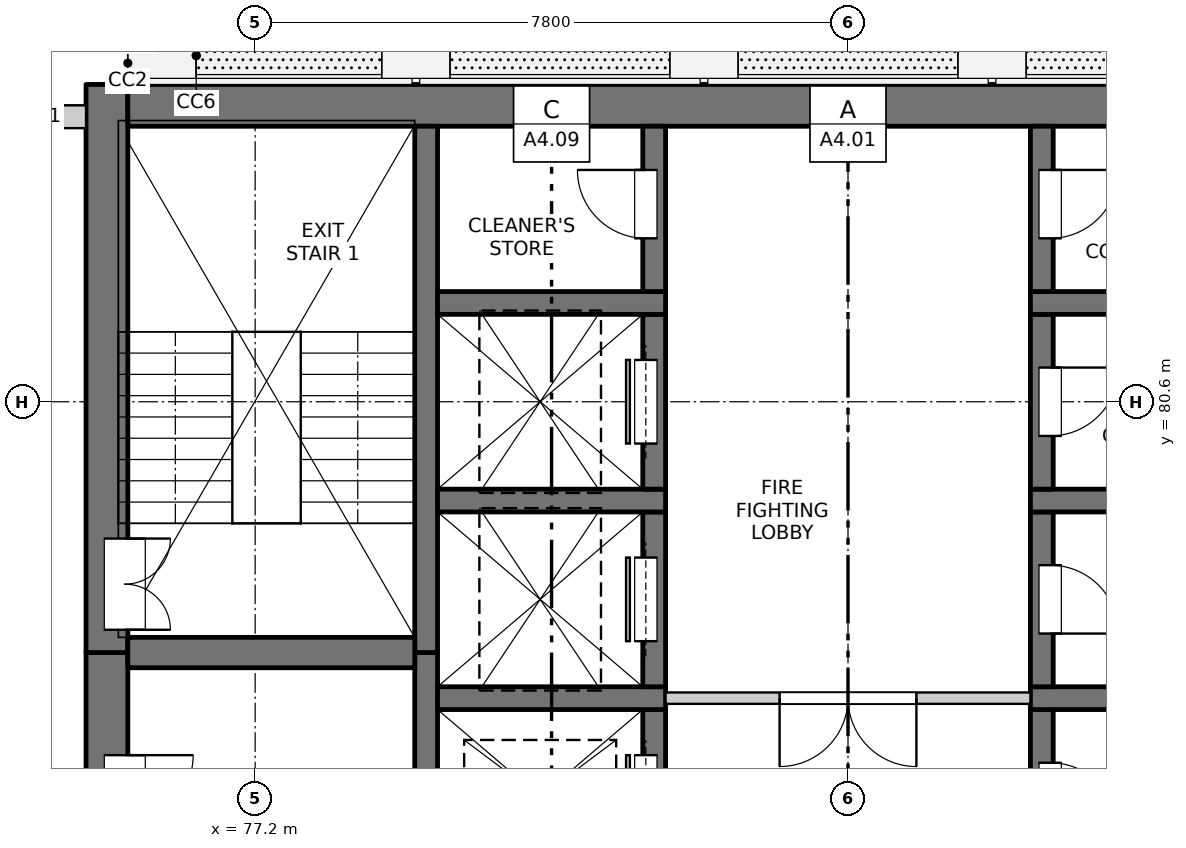
"""IFC4 building model, lengths in metres.
Left out: names, types, materials, properties, quantities, classifications, styles, units other than length and angle.
Written with IfcOpenShell. Run it as: python <this file> out.ifc"""

import sys

from ifc_helpers import new_model, si_unit, direction, frame, frame_2d, origin, place, context, subcontext, project, spatial, rectangle, extrude, element, fill, save


model = new_model("IFC4")
c1 = context("Model", 3, precision=1e-05, world=origin(), true_north=direction((0.0, 1.0)))
c2 = subcontext(c1, "Body", "Model", "MODEL_VIEW")
j1 = project(units=[si_unit("LENGTHUNIT", "METRE"), si_unit("PLANEANGLEUNIT", "RADIAN")], contexts=[c1])
p1 = place(None, origin())
s1 = spatial("IfcSite", under=j1, at=p1, CompositionType="ELEMENT")
p2 = place(p1, origin())
s2 = spatial("IfcBuilding", under=s1, at=p2, CompositionType="ELEMENT")
p3 = place(p2, frame((0.0, 0.0, 123.7)))
s3 = spatial("IfcBuildingStorey", under=s2, at=p3, CompositionType="ELEMENT", Elevation=123.7)
p4 = place(p3, frame((75.25, 54.975, -0.3), z_axis=(0.0, 0.0, 1.0), x_axis=(0.0, 1.0, 0.0)))
e1 = element("IfcWall", 1, at=p4, inside=s3, PredefinedType="SOLIDWALL", context=c2, shape_type="SweptSolid", body=[
    extrude(rectangle(XDim=22.325, YDim=0.55, at=frame_2d((11.163, 0.0))), origin(), (0.0, 0.0, 1.0), 3.45),
])
p5 = place(p4, frame((7.475, 0.0, 0.3)))
e2 = element("IfcOpeningElement", 2, at=p5, cuts=e1, PredefinedType="OPENING", context=c2, shape_type="SweptSolid", body=[
    extrude(rectangle(XDim=0.9, YDim=2.1, at=frame_2d((0.45, 1.05))), frame((0.0, 0.285, 0.0), z_axis=(0.0, -1.0, 0.0), x_axis=(1.0, 0.0, 0.0)), (0.0, 0.0, 1.0), 0.57),
])
p6 = place(p4, frame((10.775, 0.0, 0.3)))
e3 = element("IfcOpeningElement", 3, at=p6, cuts=e1, PredefinedType="OPENING", context=c2, shape_type="SweptSolid", body=[
    extrude(rectangle(XDim=0.9, YDim=2.1, at=frame_2d((0.45, 1.05))), frame((0.0, 0.285, 0.0), z_axis=(0.0, -1.0, 0.0), x_axis=(1.0, 0.0, 0.0)), (0.0, 0.0, 1.0), 0.57),
])
p7 = place(p4, frame((13.775, 0.0, 0.3)))
e4 = element("IfcOpeningElement", 4, at=p7, cuts=e1, PredefinedType="OPENING", context=c2, shape_type="SweptSolid", body=[
    extrude(rectangle(XDim=0.9, YDim=2.1, at=frame_2d((0.45, 1.05))), frame((0.0, 0.285, 0.0), z_axis=(0.0, -1.0, 0.0), x_axis=(1.0, 0.0, 0.0)), (0.0, 0.0, 1.0), 0.57),
])
p8 = place(p4, frame((16.775, 0.0, 0.3)))
e5 = element("IfcOpeningElement", 5, at=p8, cuts=e1, PredefinedType="OPENING", context=c2, shape_type="SweptSolid", body=[
    extrude(rectangle(XDim=0.9, YDim=2.1, at=frame_2d((0.45, 1.05))), frame((0.0, 0.285, 0.0), z_axis=(0.0, -1.0, 0.0), x_axis=(1.0, 0.0, 0.0)), (0.0, 0.0, 1.0), 0.57),
])
p9 = place(p4, frame((20.075, 0.0, 0.3)))
e6 = element("IfcOpeningElement", 6, at=p9, cuts=e1, PredefinedType="OPENING", context=c2, shape_type="SweptSolid", body=[
    extrude(rectangle(XDim=0.9, YDim=2.1, at=frame_2d((0.45, 1.05))), frame((0.0, 0.285, 0.0), z_axis=(0.0, -1.0, 0.0), x_axis=(1.0, 0.0, 0.0)), (0.0, 0.0, 1.0), 0.57),
])
p10 = place(p3, frame((75.25, 77.3, -0.3), z_axis=(0.0, 0.0, 1.0), x_axis=(0.0, 1.0, 0.0)))
e7 = element("IfcWall", 7, at=p10, inside=s3, PredefinedType="SOLIDWALL", context=c2, shape_type="SweptSolid", body=[
    extrude(rectangle(XDim=7.475, YDim=0.55, at=frame_2d((3.737, 0.0))), origin(), (0.0, 0.0, 1.0), 3.45),
])
p11 = place(p10, frame((0.3, 0.0, 0.3)))
e8 = element("IfcOpeningElement", 8, at=p11, cuts=e7, PredefinedType="OPENING", context=c2, shape_type="SweptSolid", body=[
    extrude(rectangle(XDim=1.2, YDim=2.1, at=frame_2d((0.6, 1.05))), frame((0.0, 0.285, 0.0), z_axis=(0.0, -1.0, 0.0), x_axis=(1.0, 0.0, 0.0)), (0.0, 0.0, 1.0), 0.57),
])
p12 = place(p3, frame((75.525, 84.5, -0.3), z_axis=(0.0, 0.0, 1.0), x_axis=(1.0, 0.0, 0.0)))
e9 = element("IfcWall", 9, at=p12, inside=s3, PredefinedType="SOLIDWALL", context=c2, shape_type="SweptSolid", body=[
    extrude(rectangle(XDim=18.95, YDim=0.55, at=frame_2d((9.475, 0.0))), origin(), (0.0, 0.0, 1.0), 3.45),
])
p13 = place(p3, frame((79.45, 60.95, -0.3), z_axis=(0.0, 0.0, 1.0), x_axis=(0.0, 1.0, 0.0)))
e10 = element("IfcWall", 10, at=p13, inside=s3, PredefinedType="SOLIDWALL", context=c2, shape_type="SweptSolid", body=[
    extrude(rectangle(XDim=16.35, YDim=0.3, at=frame_2d((8.175, 0.0))), origin(), (0.0, 0.0, 1.0), 3.45),
])
p14 = place(p3, frame((79.45, 77.3, -0.3), z_axis=(0.0, 0.0, 1.0), x_axis=(0.0, 1.0, 0.0)))
e11 = element("IfcWall", 11, at=p14, inside=s3, PredefinedType="SOLIDWALL", context=c2, shape_type="SweptSolid", body=[
    extrude(rectangle(XDim=6.925, YDim=0.3, at=frame_2d((3.462, 0.0))), origin(), (0.0, 0.0, 1.0), 3.45),
])
p15 = place(p3, frame((82.45, 74.25, -0.3), z_axis=(0.0, 0.0, 1.0), x_axis=(0.0, 1.0, 0.0)))
e12 = element("IfcWall", 12, at=p15, inside=s3, PredefinedType="SOLIDWALL", context=c2, shape_type="SweptSolid", body=[
    extrude(rectangle(XDim=2.3, YDim=0.3, at=frame_2d((1.15, 0.0))), origin(), (0.0, 0.0, 1.0), 3.45),
])
p16 = place(p15, frame((0.6, 0.0, 0.3)))
e13 = element("IfcOpeningElement", 13, at=p16, cuts=e12, PredefinedType="OPENING", context=c2, shape_type="SweptSolid", body=[
    extrude(rectangle(XDim=1.1, YDim=2.1, at=frame_2d((0.55, 1.05))), frame((0.0, 0.16, 0.0), z_axis=(0.0, -1.0, 0.0), x_axis=(1.0, 0.0, 0.0)), (0.0, 0.0, 1.0), 0.32),
])
p17 = place(p3, frame((79.6, 76.7, -0.3), z_axis=(0.0, 0.0, 1.0), x_axis=(1.0, 0.0, 0.0)))
e14 = element("IfcWall", 14, at=p17, inside=s3, PredefinedType="SOLIDWALL", context=c2, shape_type="SweptSolid", body=[
    extrude(rectangle(XDim=3.0, YDim=0.3, at=frame_2d((1.5, 0.0))), origin(), (0.0, 0.0, 1.0), 3.45),
])
p18 = place(p3, frame((82.45, 76.85, -0.3), z_axis=(0.0, 0.0, 1.0), x_axis=(0.0, 1.0, 0.0)))
e15 = element("IfcWall", 15, at=p18, inside=s3, PredefinedType="SOLIDWALL", context=c2, shape_type="SweptSolid", body=[
    extrude(rectangle(XDim=2.3, YDim=0.3, at=frame_2d((1.15, 0.0))), origin(), (0.0, 0.0, 1.0), 3.45),
])
p19 = place(p18, frame((0.6, 0.0, 0.3)))
e16 = element("IfcOpeningElement", 16, at=p19, cuts=e15, PredefinedType="OPENING", context=c2, shape_type="SweptSolid", body=[
    extrude(rectangle(XDim=1.1, YDim=2.1, at=frame_2d((0.55, 1.05))), frame((0.0, 0.16, 0.0), z_axis=(0.0, -1.0, 0.0), x_axis=(1.0, 0.0, 0.0)), (0.0, 0.0, 1.0), 0.32),
])
p20 = place(p3, frame((79.6, 79.3, -0.3), z_axis=(0.0, 0.0, 1.0), x_axis=(1.0, 0.0, 0.0)))
e17 = element("IfcWall", 17, at=p20, inside=s3, PredefinedType="SOLIDWALL", context=c2, shape_type="SweptSolid", body=[
    extrude(rectangle(XDim=3.0, YDim=0.3, at=frame_2d((1.5, 0.0))), origin(), (0.0, 0.0, 1.0), 3.45),
])
p21 = place(p3, frame((82.45, 79.45, -0.3), z_axis=(0.0, 0.0, 1.0), x_axis=(0.0, 1.0, 0.0)))
e18 = element("IfcWall", 18, at=p21, inside=s3, PredefinedType="SOLIDWALL", context=c2, shape_type="SweptSolid", body=[
    extrude(rectangle(XDim=2.3, YDim=0.3, at=frame_2d((1.15, 0.0))), origin(), (0.0, 0.0, 1.0), 3.45),
])
p22 = place(p21, frame((0.6, 0.0, 0.3)))
e19 = element("IfcOpeningElement", 19, at=p22, cuts=e18, PredefinedType="OPENING", context=c2, shape_type="SweptSolid", body=[
    extrude(rectangle(XDim=1.1, YDim=2.1, at=frame_2d((0.55, 1.05))), frame((0.0, 0.16, 0.0), z_axis=(0.0, -1.0, 0.0), x_axis=(1.0, 0.0, 0.0)), (0.0, 0.0, 1.0), 0.32),
])
p23 = place(p3, frame((79.6, 81.9, -0.3), z_axis=(0.0, 0.0, 1.0), x_axis=(1.0, 0.0, 0.0)))
e20 = element("IfcWall", 20, at=p23, inside=s3, PredefinedType="SOLIDWALL", context=c2, shape_type="SweptSolid", body=[
    extrude(rectangle(XDim=3.0, YDim=0.3, at=frame_2d((1.5, 0.0))), origin(), (0.0, 0.0, 1.0), 3.45),
])
p24 = place(p3, frame((82.45, 82.05, -0.3), z_axis=(0.0, 0.0, 1.0), x_axis=(0.0, 1.0, 0.0)))
e21 = element("IfcWall", 21, at=p24, inside=s3, PredefinedType="SOLIDWALL", context=c2, shape_type="SweptSolid", body=[
    extrude(rectangle(XDim=2.175, YDim=0.3, at=frame_2d((1.087, 0.0))), origin(), (0.0, 0.0, 1.0), 3.45),
])
p25 = place(p24, frame((0.7, 0.0, 0.3)))
e22 = element("IfcOpeningElement", 22, at=p25, cuts=e21, PredefinedType="OPENING", context=c2, shape_type="SweptSolid", body=[
    extrude(rectangle(XDim=0.9, YDim=2.1, at=frame_2d((0.45, 1.05))), frame((0.0, 0.16, 0.0), z_axis=(0.0, -1.0, 0.0), x_axis=(1.0, 0.0, 0.0)), (0.0, 0.0, 1.0), 0.32),
])
p26 = place(p3, frame((87.55, 74.25, -0.3), z_axis=(0.0, 0.0, 1.0), x_axis=(0.0, 1.0, 0.0)))
e23 = element("IfcWall", 23, at=p26, inside=s3, PredefinedType="SOLIDWALL", context=c2, shape_type="SweptSolid", body=[
    extrude(rectangle(XDim=2.3, YDim=0.3, at=frame_2d((1.15, 0.0))), origin(), (0.0, 0.0, 1.0), 3.45),
])
p27 = place(p26, frame((0.7, 0.0, 0.3)))
e24 = element("IfcOpeningElement", 24, at=p27, cuts=e23, PredefinedType="OPENING", context=c2, shape_type="SweptSolid", body=[
    extrude(rectangle(XDim=0.9, YDim=2.1, at=frame_2d((0.45, 1.05))), frame((0.0, 0.16, 0.0), z_axis=(0.0, -1.0, 0.0), x_axis=(1.0, 0.0, 0.0)), (0.0, 0.0, 1.0), 0.32),
])
p28 = place(p3, frame((87.4, 76.7, -0.3), z_axis=(0.0, 0.0, 1.0), x_axis=(1.0, 0.0, 0.0)))
e25 = element("IfcWall", 25, at=p28, inside=s3, PredefinedType="SOLIDWALL", context=c2, shape_type="SweptSolid", body=[
    extrude(rectangle(XDim=3.0, YDim=0.3, at=frame_2d((1.5, 0.0))), origin(), (0.0, 0.0, 1.0), 3.45),
])
p29 = place(p3, frame((87.55, 76.85, -0.3), z_axis=(0.0, 0.0, 1.0), x_axis=(0.0, 1.0, 0.0)))
e26 = element("IfcWall", 26, at=p29, inside=s3, PredefinedType="SOLIDWALL", context=c2, shape_type="SweptSolid", body=[
    extrude(rectangle(XDim=2.3, YDim=0.3, at=frame_2d((1.15, 0.0))), origin(), (0.0, 0.0, 1.0), 3.45),
])
p30 = place(p29, frame((0.7, 0.0, 0.3)))
e27 = element("IfcOpeningElement", 27, at=p30, cuts=e26, PredefinedType="OPENING", context=c2, shape_type="SweptSolid", body=[
    extrude(rectangle(XDim=0.9, YDim=2.1, at=frame_2d((0.45, 1.05))), frame((0.0, 0.16, 0.0), z_axis=(0.0, -1.0, 0.0), x_axis=(1.0, 0.0, 0.0)), (0.0, 0.0, 1.0), 0.32),
])
p31 = place(p3, frame((87.4, 79.3, -0.3), z_axis=(0.0, 0.0, 1.0), x_axis=(1.0, 0.0, 0.0)))
e28 = element("IfcWall", 28, at=p31, inside=s3, PredefinedType="SOLIDWALL", context=c2, shape_type="SweptSolid", body=[
    extrude(rectangle(XDim=3.0, YDim=0.3, at=frame_2d((1.5, 0.0))), origin(), (0.0, 0.0, 1.0), 3.45),
])
p32 = place(p3, frame((87.55, 79.45, -0.3), z_axis=(0.0, 0.0, 1.0), x_axis=(0.0, 1.0, 0.0)))
e29 = element("IfcWall", 29, at=p32, inside=s3, PredefinedType="SOLIDWALL", context=c2, shape_type="SweptSolid", body=[
    extrude(rectangle(XDim=2.3, YDim=0.3, at=frame_2d((1.15, 0.0))), origin(), (0.0, 0.0, 1.0), 3.45),
])
p33 = place(p32, frame((0.7, 0.0, 0.3)))
e30 = element("IfcOpeningElement", 30, at=p33, cuts=e29, PredefinedType="OPENING", context=c2, shape_type="SweptSolid", body=[
    extrude(rectangle(XDim=0.9, YDim=2.1, at=frame_2d((0.45, 1.05))), frame((0.0, 0.16, 0.0), z_axis=(0.0, -1.0, 0.0), x_axis=(1.0, 0.0, 0.0)), (0.0, 0.0, 1.0), 0.32),
])
p34 = place(p3, frame((87.4, 81.9, -0.3), z_axis=(0.0, 0.0, 1.0), x_axis=(1.0, 0.0, 0.0)))
e31 = element("IfcWall", 31, at=p34, inside=s3, PredefinedType="SOLIDWALL", context=c2, shape_type="SweptSolid", body=[
    extrude(rectangle(XDim=3.0, YDim=0.3, at=frame_2d((1.5, 0.0))), origin(), (0.0, 0.0, 1.0), 3.45),
])
p35 = place(p3, frame((87.55, 82.05, -0.3), z_axis=(0.0, 0.0, 1.0), x_axis=(0.0, 1.0, 0.0)))
e32 = element("IfcWall", 32, at=p35, inside=s3, PredefinedType="SOLIDWALL", context=c2, shape_type="SweptSolid", body=[
    extrude(rectangle(XDim=2.175, YDim=0.3, at=frame_2d((1.087, 0.0))), origin(), (0.0, 0.0, 1.0), 3.45),
])
p36 = place(p35, frame((0.7, 0.0, 0.3)))
e33 = element("IfcOpeningElement", 33, at=p36, cuts=e32, PredefinedType="OPENING", context=c2, shape_type="SweptSolid", body=[
    extrude(rectangle(XDim=0.9, YDim=2.1, at=frame_2d((0.45, 1.05))), frame((0.0, 0.16, 0.0), z_axis=(0.0, -1.0, 0.0), x_axis=(1.0, 0.0, 0.0)), (0.0, 0.0, 1.0), 0.32),
])
p37 = place(p3, frame((75.525, 77.3, -0.3), z_axis=(0.0, 0.0, 1.0), x_axis=(1.0, 0.0, 0.0)))
e34 = element("IfcWall", 34, at=p37, inside=s3, PredefinedType="SOLIDWALL", context=c2, shape_type="SweptSolid", body=[
    extrude(rectangle(XDim=3.775, YDim=0.4, at=frame_2d((1.888, 0.0))), origin(), (0.0, 0.0, 1.0), 3.45),
])
p38 = place(p3, frame((73.725, 84.35, 0.0), z_axis=(0.0, 0.0, 1.0), x_axis=(1.0, 0.0, 0.0)))
e35 = element("IfcWall", 35, at=p38, inside=s3, PredefinedType="SOLIDWALL", context=c2, shape_type="SweptSolid", body=[
    extrude(rectangle(XDim=1.25, YDim=0.3, at=frame_2d((0.625, 0.0))), origin(), (0.0, 0.0, 1.0), 2.7),
])
p39 = place(p3, frame((82.6, 76.7, 0.0), z_axis=(0.0, 0.0, 1.0), x_axis=(1.0, 0.0, 0.0)))
e36 = element("IfcWall", 36, at=p39, inside=s3, PredefinedType="PARTITIONING", context=c2, shape_type="SweptSolid", body=[
    extrude(rectangle(XDim=4.8, YDim=0.15, at=frame_2d((2.4, 0.0))), origin(), (0.0, 0.0, 1.0), 3.15),
])
p40 = place(p39, frame((1.5, 0.0, 0.0)))
e37 = element("IfcOpeningElement", 37, at=p40, cuts=e36, PredefinedType="OPENING", context=c2, shape_type="SweptSolid", body=[
    extrude(rectangle(XDim=1.8, YDim=2.1, at=frame_2d((0.9, 1.05))), frame((0.0, 0.085, 0.0), z_axis=(0.0, -1.0, 0.0), x_axis=(1.0, 0.0, 0.0)), (0.0, 0.0, 1.0), 0.17),
])
p41 = place(p16, origin())
e38 = element("IfcDoor", 38, at=p41, inside=s3, OperationType="SLIDING_TO_LEFT", PredefinedType="DOOR", context=c2, shape_type="SweptSolid", body=[
    extrude(rectangle(XDim=1.1, YDim=2.1, at=frame_2d((0.55, 1.05))), frame((0.0, 0.135, 0.0), z_axis=(0.0, -1.0, 0.0), x_axis=(1.0, 0.0, 0.0)), (0.0, 0.0, 1.0), 0.05),
])
fill(e13, e38)
p42 = place(p27, origin())
e39 = element("IfcDoor", 39, at=p42, inside=s3, OperationType="SINGLE_SWING_RIGHT", PredefinedType="DOOR", context=c2, shape_type="SweptSolid", body=[
    extrude(rectangle(XDim=0.9, YDim=2.1, at=frame_2d((0.45, 1.05))), frame((0.0, -0.085, 0.0), z_axis=(0.0, -1.0, 0.0), x_axis=(1.0, 0.0, 0.0)), (0.0, 0.0, 1.0), 0.05),
])
fill(e24, e39)
p43 = place(p9, origin())
e40 = element("IfcDoor", 40, at=p43, inside=s3, OperationType="SINGLE_SWING_LEFT", PredefinedType="DOOR", context=c2, shape_type="SweptSolid", body=[
    extrude(rectangle(XDim=0.9, YDim=2.1, at=frame_2d((0.45, 1.05))), frame((0.0, -0.21, 0.0), z_axis=(0.0, -1.0, 0.0), x_axis=(1.0, 0.0, 0.0)), (0.0, 0.0, 1.0), 0.05),
])
fill(e6, e40)
p44 = place(p40, origin())
e41 = element("IfcDoor", 41, at=p44, inside=s3, OperationType="DOUBLE_DOOR_SINGLE_SWING", PredefinedType="DOOR", context=c2, shape_type="SweptSolid", body=[
    extrude(rectangle(XDim=1.8, YDim=2.1, at=frame_2d((0.9, 1.05))), frame((0.0, 0.025, 0.0), z_axis=(0.0, -1.0, 0.0), x_axis=(1.0, 0.0, 0.0)), (0.0, 0.0, 1.0), 0.05),
])
fill(e37, e41)
p45 = place(p19, origin())
e42 = element("IfcDoor", 42, at=p45, inside=s3, OperationType="SLIDING_TO_LEFT", PredefinedType="DOOR", context=c2, shape_type="SweptSolid", body=[
    extrude(rectangle(XDim=1.1, YDim=2.1, at=frame_2d((0.55, 1.05))), frame((0.0, 0.135, 0.0), z_axis=(0.0, -1.0, 0.0), x_axis=(1.0, 0.0, 0.0)), (0.0, 0.0, 1.0), 0.05),
])
fill(e16, e42)
p46 = place(p30, origin())
e43 = element("IfcDoor", 43, at=p46, inside=s3, OperationType="SINGLE_SWING_RIGHT", PredefinedType="DOOR", context=c2, shape_type="SweptSolid", body=[
    extrude(rectangle(XDim=0.9, YDim=2.1, at=frame_2d((0.45, 1.05))), frame((0.0, -0.085, 0.0), z_axis=(0.0, -1.0, 0.0), x_axis=(1.0, 0.0, 0.0)), (0.0, 0.0, 1.0), 0.05),
])
fill(e27, e43)
p47 = place(p11, origin())
e44 = element("IfcDoor", 44, at=p47, inside=s3, OperationType="DOUBLE_DOOR_SINGLE_SWING", PredefinedType="DOOR", context=c2, shape_type="SweptSolid", body=[
    extrude(rectangle(XDim=1.2, YDim=2.1, at=frame_2d((0.6, 1.05))), frame((0.0, -0.21, 0.0), z_axis=(0.0, -1.0, 0.0), x_axis=(1.0, 0.0, 0.0)), (0.0, 0.0, 1.0), 0.05),
])
fill(e8, e44)
p48 = place(p22, origin())
e45 = element("IfcDoor", 45, at=p48, inside=s3, OperationType="SLIDING_TO_LEFT", PredefinedType="DOOR", context=c2, shape_type="SweptSolid", body=[
    extrude(rectangle(XDim=1.1, YDim=2.1, at=frame_2d((0.55, 1.05))), frame((0.0, 0.135, 0.0), z_axis=(0.0, -1.0, 0.0), x_axis=(1.0, 0.0, 0.0)), (0.0, 0.0, 1.0), 0.05),
])
fill(e19, e45)
p49 = place(p33, origin())
e46 = element("IfcDoor", 46, at=p49, inside=s3, OperationType="SINGLE_SWING_LEFT", PredefinedType="DOOR", context=c2, shape_type="SweptSolid", body=[
    extrude(rectangle(XDim=0.9, YDim=2.1, at=frame_2d((0.45, 1.05))), frame((0.0, -0.085, 0.0), z_axis=(0.0, -1.0, 0.0), x_axis=(1.0, 0.0, 0.0)), (0.0, 0.0, 1.0), 0.05),
])
fill(e30, e46)
p50 = place(p25, origin())
e47 = element("IfcDoor", 47, at=p50, inside=s3, OperationType="SINGLE_SWING_RIGHT", PredefinedType="DOOR", context=c2, shape_type="SweptSolid", body=[
    extrude(rectangle(XDim=0.9, YDim=2.1, at=frame_2d((0.45, 1.05))), frame((0.0, 0.135, 0.0), z_axis=(0.0, -1.0, 0.0), x_axis=(1.0, 0.0, 0.0)), (0.0, 0.0, 1.0), 0.05),
])
fill(e22, e47)
p51 = place(p36, origin())
e48 = element("IfcDoor", 48, at=p51, inside=s3, OperationType="SINGLE_SWING_LEFT", PredefinedType="DOOR", context=c2, shape_type="SweptSolid", body=[
    extrude(rectangle(XDim=0.9, YDim=2.1, at=frame_2d((0.45, 1.05))), frame((0.0, -0.085, 0.0), z_axis=(0.0, -1.0, 0.0), x_axis=(1.0, 0.0, 0.0)), (0.0, 0.0, 1.0), 0.05),
])
fill(e33, e48)
save(model, sys.argv[1])
